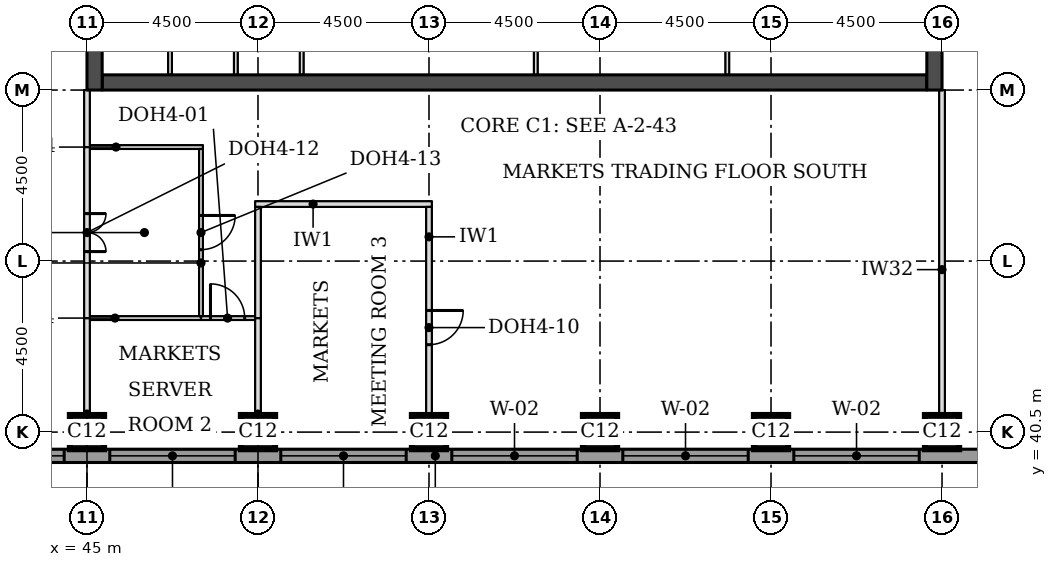
"""IFC4 building model, lengths in metres.
Left out: names, types, materials, properties, quantities, classifications, styles, units other than length and angle.
Written with IfcOpenShell. Run it as: python <this file> out.ifc"""

import sys

from ifc_helpers import new_model, si_unit, direction, frame, frame_2d, origin, origin_2d, place, context, subcontext, project, spatial, rectangle, extrude, element, fill, save


model = new_model("IFC4")
c1 = context("Model", 3, precision=1e-05, world=origin(), true_north=direction((0.0, 1.0)))
c2 = subcontext(c1, "Body", "Model", "MODEL_VIEW")
j1 = project(units=[si_unit("LENGTHUNIT", "METRE"), si_unit("PLANEANGLEUNIT", "RADIAN")], contexts=[c1])
p1 = place(None, origin())
s1 = spatial("IfcSite", under=j1, at=p1, CompositionType="ELEMENT")
p2 = place(p1, origin())
s2 = spatial("IfcBuilding", under=s1, at=p2, CompositionType="ELEMENT")
p3 = place(p2, frame((0.0, 0.0, 173.6)))
s3 = spatial("IfcBuildingStorey", under=s2, at=p3, CompositionType="ELEMENT", Elevation=173.6)
for number, where, z_axis, x_axis in (
    (1, (45.0, 40.5, 0.0), (0.0, 0.0, 1.0), (1.0, 0.0, 0.0)),
    (2, (49.5, 40.5, 0.0), (0.0, 0.0, 1.0), (1.0, 0.0, 0.0)),
    (3, (54.0, 40.5, 0.0), (0.0, 0.0, 1.0), (1.0, 0.0, 0.0)),
    (4, (58.5, 40.5, 0.0), (0.0, 0.0, 1.0), (1.0, 0.0, 0.0)),
    (5, (63.0, 40.5, 0.0), (0.0, 0.0, 1.0), (1.0, 0.0, 0.0)),
    (6, (67.5, 40.5, 0.0), (0.0, 0.0, 1.0), (1.0, 0.0, 0.0)),
):
    element("IfcColumn", number, at=place(p3, frame(where, z_axis=z_axis, x_axis=x_axis)), inside=s3, PredefinedType="COLUMN", context=c2, shape_type="SweptSolid", body=[
        extrude(rectangle(XDim=0.9, YDim=0.9, at=origin_2d()), origin(), (0.0, 0.0, 1.0), 3.7),
    ])
p4 = place(p3, frame((45.4, 49.7, 0.0), z_axis=(0.0, 0.0, 1.0), x_axis=(1.0, 0.0, 0.0)))
e7 = element("IfcWall", 7, at=p4, inside=s3, PredefinedType="SHEAR", context=c2, shape_type="SweptSolid", body=[
    extrude(rectangle(XDim=21.7, YDim=0.4, at=frame_2d((10.85, 0.0))), origin(), (0.0, 0.0, 1.0), 3.7),
])
p5 = place(p3, frame((45.2, 49.5, 0.0), z_axis=(0.0, 0.0, 1.0), x_axis=(0.0, 1.0, 0.0)))
e8 = element("IfcWall", 8, at=p5, inside=s3, PredefinedType="SHEAR", context=c2, shape_type="SweptSolid", body=[
    extrude(rectangle(XDim=22.5, YDim=0.4, at=frame_2d((11.25, 0.0))), origin(), (0.0, 0.0, 1.0), 3.7),
])
p6 = place(p5, frame((4.2, 0.0, 0.0)))
e9 = element("IfcOpeningElement", 9, at=p6, cuts=e8, PredefinedType="OPENING", context=c2, shape_type="SweptSolid", body=[
    extrude(rectangle(XDim=1.8, YDim=2.1, at=frame_2d((0.9, 1.05))), frame((0.0, 0.21, 0.0), z_axis=(0.0, -1.0, 0.0), x_axis=(1.0, 0.0, 0.0)), (0.0, 0.0, 1.0), 0.42),
])
p7 = place(p5, frame((6.9, 0.0, 0.0)))
e10 = element("IfcOpeningElement", 10, at=p7, cuts=e8, PredefinedType="OPENING", context=c2, shape_type="SweptSolid", body=[
    extrude(rectangle(XDim=1.1, YDim=2.1, at=frame_2d((0.55, 1.05))), frame((0.0, 0.21, 0.0), z_axis=(0.0, -1.0, 0.0), x_axis=(1.0, 0.0, 0.0)), (0.0, 0.0, 1.0), 0.42),
])
p8 = place(p5, frame((13.6, 0.0, 0.0)))
e11 = element("IfcOpeningElement", 11, at=p8, cuts=e8, PredefinedType="OPENING", context=c2, shape_type="SweptSolid", body=[
    extrude(rectangle(XDim=1.1, YDim=2.1, at=frame_2d((0.55, 1.05))), frame((0.0, 0.21, 0.0), z_axis=(0.0, -1.0, 0.0), x_axis=(1.0, 0.0, 0.0)), (0.0, 0.0, 1.0), 0.42),
])
p9 = place(p5, frame((16.5, 0.0, 0.0)))
e12 = element("IfcOpeningElement", 12, at=p9, cuts=e8, PredefinedType="OPENING", context=c2, shape_type="SweptSolid", body=[
    extrude(rectangle(XDim=1.8, YDim=2.1, at=frame_2d((0.9, 1.05))), frame((0.0, 0.21, 0.0), z_axis=(0.0, -1.0, 0.0), x_axis=(1.0, 0.0, 0.0)), (0.0, 0.0, 1.0), 0.42),
])
p10 = place(p3, frame((67.3, 49.5, 0.0), z_axis=(0.0, 0.0, 1.0), x_axis=(0.0, 1.0, 0.0)))
e13 = element("IfcWall", 13, at=p10, inside=s3, PredefinedType="SHEAR", context=c2, shape_type="SweptSolid", body=[
    extrude(rectangle(XDim=22.5, YDim=0.4, at=frame_2d((11.25, 0.0))), origin(), (0.0, 0.0, 1.0), 3.7),
])
p11 = place(p10, frame((4.2, 0.0, 0.0)))
e14 = element("IfcOpeningElement", 14, at=p11, cuts=e13, PredefinedType="OPENING", context=c2, shape_type="SweptSolid", body=[
    extrude(rectangle(XDim=1.8, YDim=2.1, at=frame_2d((0.9, 1.05))), frame((0.0, 0.21, 0.0), z_axis=(0.0, -1.0, 0.0), x_axis=(1.0, 0.0, 0.0)), (0.0, 0.0, 1.0), 0.42),
])
p12 = place(p10, frame((6.9, 0.0, 0.0)))
e15 = element("IfcOpeningElement", 15, at=p12, cuts=e13, PredefinedType="OPENING", context=c2, shape_type="SweptSolid", body=[
    extrude(rectangle(XDim=1.1, YDim=2.1, at=frame_2d((0.55, 1.05))), frame((0.0, 0.21, 0.0), z_axis=(0.0, -1.0, 0.0), x_axis=(1.0, 0.0, 0.0)), (0.0, 0.0, 1.0), 0.42),
])
p13 = place(p10, frame((13.6, 0.0, 0.0)))
e16 = element("IfcOpeningElement", 16, at=p13, cuts=e13, PredefinedType="OPENING", context=c2, shape_type="SweptSolid", body=[
    extrude(rectangle(XDim=1.1, YDim=2.1, at=frame_2d((0.55, 1.05))), frame((0.0, 0.21, 0.0), z_axis=(0.0, -1.0, 0.0), x_axis=(1.0, 0.0, 0.0)), (0.0, 0.0, 1.0), 0.42),
])
p14 = place(p10, frame((16.5, 0.0, 0.0)))
e17 = element("IfcOpeningElement", 17, at=p14, cuts=e13, PredefinedType="OPENING", context=c2, shape_type="SweptSolid", body=[
    extrude(rectangle(XDim=1.8, YDim=2.1, at=frame_2d((0.9, 1.05))), frame((0.0, 0.21, 0.0), z_axis=(0.0, -1.0, 0.0), x_axis=(1.0, 0.0, 0.0)), (0.0, 0.0, 1.0), 0.42),
])
p15 = place(p3, frame((36.0, 39.875, 0.0), z_axis=(0.0, 0.0, 1.0), x_axis=(1.0, 0.0, 0.0)))
e18 = element("IfcWall", 18, at=p15, inside=s3, PredefinedType="STANDARD", context=c2, shape_type="SweptSolid", body=[
    extrude(rectangle(XDim=36.331, YDim=0.35, at=frame_2d((18.166, 0.0))), origin(), (0.0, 0.0, 1.0), 3.525),
])
p16 = place(p15, frame((5.1, 0.0, 0.9)))
e19 = element("IfcOpeningElement", 19, at=p16, cuts=e18, PredefinedType="OPENING", context=c2, shape_type="SweptSolid", body=[
    extrude(rectangle(XDim=3.3, YDim=1.9, at=frame_2d((1.65, 0.95))), frame((0.0, 0.185, 0.0), z_axis=(0.0, -1.0, 0.0), x_axis=(1.0, 0.0, 0.0)), (0.0, 0.0, 1.0), 0.37),
])
p17 = place(p15, frame((9.6, 0.0, 0.9)))
e20 = element("IfcOpeningElement", 20, at=p17, cuts=e18, PredefinedType="OPENING", context=c2, shape_type="SweptSolid", body=[
    extrude(rectangle(XDim=3.3, YDim=1.9, at=frame_2d((1.65, 0.95))), frame((0.0, 0.185, 0.0), z_axis=(0.0, -1.0, 0.0), x_axis=(1.0, 0.0, 0.0)), (0.0, 0.0, 1.0), 0.37),
])
p18 = place(p15, frame((14.1, 0.0, 0.9)))
e21 = element("IfcOpeningElement", 21, at=p18, cuts=e18, PredefinedType="OPENING", context=c2, shape_type="SweptSolid", body=[
    extrude(rectangle(XDim=3.3, YDim=1.9, at=frame_2d((1.65, 0.95))), frame((0.0, 0.185, 0.0), z_axis=(0.0, -1.0, 0.0), x_axis=(1.0, 0.0, 0.0)), (0.0, 0.0, 1.0), 0.37),
])
p19 = place(p15, frame((18.6, 0.0, 0.9)))
e22 = element("IfcOpeningElement", 22, at=p19, cuts=e18, PredefinedType="OPENING", context=c2, shape_type="SweptSolid", body=[
    extrude(rectangle(XDim=3.3, YDim=1.9, at=frame_2d((1.65, 0.95))), frame((0.0, 0.185, 0.0), z_axis=(0.0, -1.0, 0.0), x_axis=(1.0, 0.0, 0.0)), (0.0, 0.0, 1.0), 0.37),
])
p20 = place(p15, frame((23.1, 0.0, 0.9)))
e23 = element("IfcOpeningElement", 23, at=p20, cuts=e18, PredefinedType="OPENING", context=c2, shape_type="SweptSolid", body=[
    extrude(rectangle(XDim=3.3, YDim=1.9, at=frame_2d((1.65, 0.95))), frame((0.0, 0.185, 0.0), z_axis=(0.0, -1.0, 0.0), x_axis=(1.0, 0.0, 0.0)), (0.0, 0.0, 1.0), 0.37),
])
p21 = place(p15, frame((27.6, 0.0, 0.9)))
e24 = element("IfcOpeningElement", 24, at=p21, cuts=e18, PredefinedType="OPENING", context=c2, shape_type="SweptSolid", body=[
    extrude(rectangle(XDim=3.3, YDim=1.9, at=frame_2d((1.65, 0.95))), frame((0.0, 0.185, 0.0), z_axis=(0.0, -1.0, 0.0), x_axis=(1.0, 0.0, 0.0)), (0.0, 0.0, 1.0), 0.37),
])
p22 = place(p3, frame((45.075, 43.5, 0.0), z_axis=(0.0, 0.0, 1.0), x_axis=(1.0, 0.0, 0.0)))
e25 = element("IfcWall", 25, at=p22, inside=s3, PredefinedType="PARTITIONING", context=c2, shape_type="SweptSolid", body=[
    extrude(rectangle(XDim=2.925, YDim=0.1, at=frame_2d((1.462, 0.0))), origin(), (0.0, 0.0, 1.0), 3.55),
])
p23 = place(p3, frame((48.0, 43.5, 0.0), z_axis=(0.0, 0.0, 1.0), x_axis=(1.0, 0.0, 0.0)))
e26 = element("IfcWall", 26, at=p23, inside=s3, PredefinedType="PARTITIONING", context=c2, shape_type="SweptSolid", body=[
    extrude(rectangle(XDim=1.425, YDim=0.1, at=frame_2d((0.712, 0.0))), origin(), (0.0, 0.0, 1.0), 3.55),
])
p24 = place(p23, frame((0.25, 0.0, 0.0)))
e27 = element("IfcOpeningElement", 27, at=p24, cuts=e26, PredefinedType="OPENING", context=c2, shape_type="SweptSolid", body=[
    extrude(rectangle(XDim=0.9, YDim=2.1, at=frame_2d((0.45, 1.05))), frame((0.0, 0.06, 0.0), z_axis=(0.0, -1.0, 0.0), x_axis=(1.0, 0.0, 0.0)), (0.0, 0.0, 1.0), 0.12),
])
p25 = place(p3, frame((49.425, 46.5, 0.0), z_axis=(0.0, 0.0, 1.0), x_axis=(1.0, 0.0, 0.0)))
e28 = element("IfcWall", 28, at=p25, inside=s3, PredefinedType="PARTITIONING", context=c2, shape_type="SweptSolid", body=[
    extrude(rectangle(XDim=4.65, YDim=0.15, at=frame_2d((2.325, 0.0))), origin(), (0.0, 0.0, 1.0), 3.55),
])
p26 = place(p3, frame((45.075, 48.0, 0.0), z_axis=(0.0, 0.0, 1.0), x_axis=(1.0, 0.0, 0.0)))
e29 = element("IfcWall", 29, at=p26, inside=s3, PredefinedType="PARTITIONING", context=c2, shape_type="SweptSolid", body=[
    extrude(rectangle(XDim=2.975, YDim=0.1, at=frame_2d((1.488, 0.0))), origin(), (0.0, 0.0, 1.0), 3.55),
])
p27 = place(p3, frame((45.0, 40.05, 0.0), z_axis=(0.0, 0.0, 1.0), x_axis=(0.0, 1.0, 0.0)))
e30 = element("IfcWall", 30, at=p27, inside=s3, PredefinedType="PARTITIONING", context=c2, shape_type="SweptSolid", body=[
    extrude(rectangle(XDim=3.45, YDim=0.15, at=frame_2d((1.725, 0.0))), origin(), (0.0, 0.0, 1.0), 3.022),
])
p28 = place(p3, frame((49.5, 40.05, 0.0), z_axis=(0.0, 0.0, 1.0), x_axis=(0.0, 1.0, 0.0)))
e31 = element("IfcWall", 31, at=p28, inside=s3, PredefinedType="PARTITIONING", context=c2, shape_type="SweptSolid", body=[
    extrude(rectangle(XDim=3.45, YDim=0.15, at=frame_2d((1.725, 0.0))), origin(), (0.0, 0.0, 1.0), 3.55),
])
p29 = place(p3, frame((54.0, 40.05, 0.0), z_axis=(0.0, 0.0, 1.0), x_axis=(0.0, 1.0, 0.0)))
e32 = element("IfcWall", 32, at=p29, inside=s3, PredefinedType="PARTITIONING", context=c2, shape_type="SweptSolid", body=[
    extrude(rectangle(XDim=6.375, YDim=0.15, at=frame_2d((3.188, 0.0))), origin(), (0.0, 0.0, 1.0), 3.55),
])
p30 = place(p29, frame((2.75, 0.0, 0.0)))
e33 = element("IfcOpeningElement", 33, at=p30, cuts=e32, PredefinedType="OPENING", context=c2, shape_type="SweptSolid", body=[
    extrude(rectangle(XDim=0.9, YDim=2.1, at=frame_2d((0.45, 1.05))), frame((0.0, 0.085, 0.0), z_axis=(0.0, -1.0, 0.0), x_axis=(1.0, 0.0, 0.0)), (0.0, 0.0, 1.0), 0.17),
])
p31 = place(p3, frame((67.5, 40.05, 0.0), z_axis=(0.0, 0.0, 1.0), x_axis=(0.0, 1.0, 0.0)))
e34 = element("IfcWall", 34, at=p31, inside=s3, PredefinedType="PARTITIONING", context=c2, shape_type="SweptSolid", body=[
    extrude(rectangle(XDim=9.45, YDim=0.15, at=frame_2d((4.725, 0.0))), origin(), (0.0, 0.0, 1.0), 3.022),
])
p32 = place(p3, frame((45.0, 43.5, 0.0), z_axis=(0.0, 0.0, 1.0), x_axis=(0.0, 1.0, 0.0)))
e35 = element("IfcWall", 35, at=p32, inside=s3, PredefinedType="PARTITIONING", context=c2, shape_type="SweptSolid", body=[
    extrude(rectangle(XDim=4.5, YDim=0.15, at=frame_2d((2.25, 0.0))), origin(), (0.0, 0.0, 1.0), 3.022),
])
p33 = place(p32, frame((1.75, 0.0, 0.0)))
e36 = element("IfcOpeningElement", 36, at=p33, cuts=e35, PredefinedType="OPENING", context=c2, shape_type="SweptSolid", body=[
    extrude(rectangle(XDim=1.0, YDim=2.1, at=frame_2d((0.5, 1.05))), frame((0.0, 0.085, 0.0), z_axis=(0.0, -1.0, 0.0), x_axis=(1.0, 0.0, 0.0)), (0.0, 0.0, 1.0), 0.17),
])
p34 = place(p3, frame((49.5, 43.5, 0.0), z_axis=(0.0, 0.0, 1.0), x_axis=(0.0, 1.0, 0.0)))
e37 = element("IfcWall", 37, at=p34, inside=s3, PredefinedType="PARTITIONING", context=c2, shape_type="SweptSolid", body=[
    extrude(rectangle(XDim=2.925, YDim=0.15, at=frame_2d((1.462, 0.0))), origin(), (0.0, 0.0, 1.0), 3.55),
])
p35 = place(p3, frame((48.0, 43.55, 0.0), z_axis=(0.0, 0.0, 1.0), x_axis=(0.0, 1.0, 0.0)))
e38 = element("IfcWall", 38, at=p35, inside=s3, PredefinedType="PARTITIONING", context=c2, shape_type="SweptSolid", body=[
    extrude(rectangle(XDim=4.4, YDim=0.1, at=frame_2d((2.2, 0.0))), origin(), (0.0, 0.0, 1.0), 3.55),
])
p36 = place(p35, frame((1.75, 0.0, 0.0)))
e39 = element("IfcOpeningElement", 39, at=p36, cuts=e38, PredefinedType="OPENING", context=c2, shape_type="SweptSolid", body=[
    extrude(rectangle(XDim=0.9, YDim=2.1, at=frame_2d((0.45, 1.05))), frame((0.0, 0.06, 0.0), z_axis=(0.0, -1.0, 0.0), x_axis=(1.0, 0.0, 0.0)), (0.0, 0.0, 1.0), 0.12),
])
p37 = place(p3, frame((45.0, 48.0, 0.0), z_axis=(0.0, 0.0, 1.0), x_axis=(0.0, 1.0, 0.0)))
e40 = element("IfcWall", 40, at=p37, inside=s3, PredefinedType="PARTITIONING", context=c2, shape_type="SweptSolid", body=[
    extrude(rectangle(XDim=1.5, YDim=0.15, at=frame_2d((0.75, 0.0))), origin(), (0.0, 0.0, 1.0), 3.022),
])
for number, where, z_axis, x_axis in (
    (41, (47.185, 49.9, 0.0), (0.0, 0.0, 1.0), (0.0, 1.0, 0.0)),
    (42, (48.917, 49.9, 0.0), (0.0, 0.0, 1.0), (0.0, 1.0, 0.0)),
    (43, (50.65, 49.9, 0.0), (0.0, 0.0, 1.0), (0.0, 1.0, 0.0)),
    (44, (56.81, 49.9, 0.0), (0.0, 0.0, 1.0), (0.0, 1.0, 0.0)),
    (45, (61.85, 49.9, 0.0), (0.0, 0.0, 1.0), (0.0, 1.0, 0.0)),
):
    element("IfcWall", number, at=place(p3, frame(where, z_axis=z_axis, x_axis=x_axis)), inside=s3, PredefinedType="PARTITIONING", context=c2, shape_type="SweptSolid", body=[
        extrude(rectangle(XDim=3.1, YDim=0.1, at=frame_2d((1.55, 0.0))), origin(), (0.0, 0.0, 1.0), 3.55),
    ])
p38 = place(p16, origin())
e46 = element("IfcWindow", 46, at=p38, inside=s3, PartitioningType="SINGLE_PANEL", PredefinedType="WINDOW", context=c2, shape_type="SweptSolid", body=[
    extrude(rectangle(XDim=3.3, YDim=1.9, at=frame_2d((1.65, 0.95))), frame((0.0, 0.085, 0.0), z_axis=(0.0, -1.0, 0.0), x_axis=(1.0, 0.0, 0.0)), (0.0, 0.0, 1.0), 0.06),
])
fill(e19, e46)
p39 = place(p17, origin())
e47 = element("IfcWindow", 47, at=p39, inside=s3, PartitioningType="SINGLE_PANEL", PredefinedType="WINDOW", context=c2, shape_type="SweptSolid", body=[
    extrude(rectangle(XDim=3.3, YDim=1.9, at=frame_2d((1.65, 0.95))), frame((0.0, 0.085, 0.0), z_axis=(0.0, -1.0, 0.0), x_axis=(1.0, 0.0, 0.0)), (0.0, 0.0, 1.0), 0.06),
])
fill(e20, e47)
p40 = place(p18, origin())
e48 = element("IfcWindow", 48, at=p40, inside=s3, PartitioningType="SINGLE_PANEL", PredefinedType="WINDOW", context=c2, shape_type="SweptSolid", body=[
    extrude(rectangle(XDim=3.3, YDim=1.9, at=frame_2d((1.65, 0.95))), frame((0.0, 0.085, 0.0), z_axis=(0.0, -1.0, 0.0), x_axis=(1.0, 0.0, 0.0)), (0.0, 0.0, 1.0), 0.06),
])
fill(e21, e48)
p41 = place(p19, origin())
e49 = element("IfcWindow", 49, at=p41, inside=s3, PartitioningType="SINGLE_PANEL", PredefinedType="WINDOW", context=c2, shape_type="SweptSolid", body=[
    extrude(rectangle(XDim=3.3, YDim=1.9, at=frame_2d((1.65, 0.95))), frame((0.0, 0.085, 0.0), z_axis=(0.0, -1.0, 0.0), x_axis=(1.0, 0.0, 0.0)), (0.0, 0.0, 1.0), 0.06),
])
fill(e22, e49)
p42 = place(p20, origin())
e50 = element("IfcWindow", 50, at=p42, inside=s3, PartitioningType="SINGLE_PANEL", PredefinedType="WINDOW", context=c2, shape_type="SweptSolid", body=[
    extrude(rectangle(XDim=3.3, YDim=1.9, at=frame_2d((1.65, 0.95))), frame((0.0, 0.085, 0.0), z_axis=(0.0, -1.0, 0.0), x_axis=(1.0, 0.0, 0.0)), (0.0, 0.0, 1.0), 0.06),
])
fill(e23, e50)
p43 = place(p21, origin())
e51 = element("IfcWindow", 51, at=p43, inside=s3, PartitioningType="SINGLE_PANEL", PredefinedType="WINDOW", context=c2, shape_type="SweptSolid", body=[
    extrude(rectangle(XDim=3.3, YDim=1.9, at=frame_2d((1.65, 0.95))), frame((0.0, 0.085, 0.0), z_axis=(0.0, -1.0, 0.0), x_axis=(1.0, 0.0, 0.0)), (0.0, 0.0, 1.0), 0.06),
])
fill(e24, e51)
p44 = place(p33, frame((1.0, 0.0, 0.0), z_axis=(0.0, 0.0, 1.0), x_axis=(-1.0, 0.0, 0.0)))
e52 = element("IfcDoor", 52, at=p44, inside=s3, OperationType="DOUBLE_DOOR_SINGLE_SWING", PredefinedType="DOOR", context=c2, shape_type="SweptSolid", body=[
    extrude(rectangle(XDim=1.0, YDim=2.1, at=frame_2d((0.5, 1.05))), frame((0.0, 0.025, 0.0), z_axis=(0.0, -1.0, 0.0), x_axis=(1.0, 0.0, 0.0)), (0.0, 0.0, 1.0), 0.05),
])
fill(e36, e52)
p45 = place(p36, frame((0.9, 0.0, 0.0), z_axis=(0.0, 0.0, 1.0), x_axis=(-1.0, 0.0, 0.0)))
e53 = element("IfcDoor", 53, at=p45, inside=s3, OperationType="SINGLE_SWING_LEFT", PredefinedType="DOOR", context=c2, shape_type="SweptSolid", body=[
    extrude(rectangle(XDim=0.9, YDim=2.1, at=frame_2d((0.45, 1.05))), frame((0.0, 0.025, 0.0), z_axis=(0.0, -1.0, 0.0), x_axis=(1.0, 0.0, 0.0)), (0.0, 0.0, 1.0), 0.05),
])
fill(e39, e53)
p46 = place(p30, frame((0.9, 0.0, 0.0), z_axis=(0.0, 0.0, 1.0), x_axis=(-1.0, 0.0, 0.0)))
e54 = element("IfcDoor", 54, at=p46, inside=s3, OperationType="SINGLE_SWING_LEFT", PredefinedType="DOOR", context=c2, shape_type="SweptSolid", body=[
    extrude(rectangle(XDim=0.9, YDim=2.1, at=frame_2d((0.45, 1.05))), frame((0.0, 0.025, 0.0), z_axis=(0.0, -1.0, 0.0), x_axis=(1.0, 0.0, 0.0)), (0.0, 0.0, 1.0), 0.05),
])
fill(e33, e54)
p47 = place(p24, origin())
e55 = element("IfcDoor", 55, at=p47, inside=s3, OperationType="SINGLE_SWING_LEFT", PredefinedType="DOOR", context=c2, shape_type="SweptSolid", body=[
    extrude(rectangle(XDim=0.9, YDim=2.1, at=frame_2d((0.45, 1.05))), frame((0.0, 0.025, 0.0), z_axis=(0.0, -1.0, 0.0), x_axis=(1.0, 0.0, 0.0)), (0.0, 0.0, 1.0), 0.05),
])
fill(e27, e55)
save(model, sys.argv[1])
